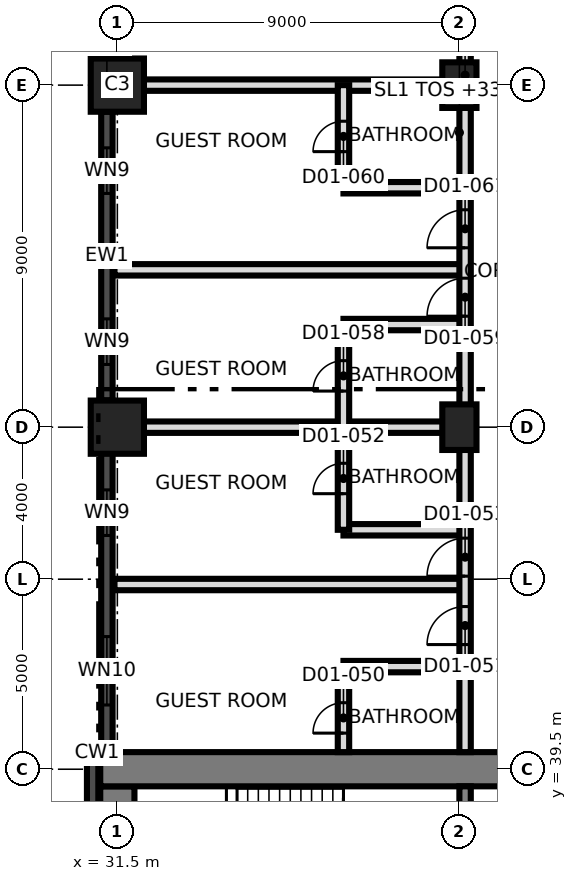
"""IFC4 building model, lengths in metres.
Left out: names, types, materials, properties, quantities, classifications, styles, units other than length and angle.
Written with IfcOpenShell. Run it as: python <this file> out.ifc"""

import sys

from ifc_helpers import new_model, si_unit, direction, frame, frame_2d, origin, origin_2d, place, context, subcontext, project, spatial, rectangle, extrude, element, fill, save


model = new_model("IFC4")
c1 = context("Model", 3, precision=1e-05, world=origin(), true_north=direction((0.0, 1.0)))
c2 = subcontext(c1, "Body", "Model", "MODEL_VIEW")
j1 = project(units=[si_unit("LENGTHUNIT", "METRE"), si_unit("PLANEANGLEUNIT", "RADIAN")], contexts=[c1])
p1 = place(None, origin())
s1 = spatial("IfcSite", under=j1, at=p1, CompositionType="ELEMENT")
p2 = place(p1, origin())
s2 = spatial("IfcBuilding", under=s1, at=p2, CompositionType="ELEMENT")
p3 = place(p2, frame((0.0, 0.0, 33.5)))
s3 = spatial("IfcBuildingStorey", under=s2, at=p3, CompositionType="ELEMENT", Elevation=33.5)
p4 = place(p3, frame((31.5, 21.95, 0.0), z_axis=(0.0, 0.0, 1.0), x_axis=(0.0, 1.0, 0.0)))
e1 = element("IfcWall", 1, at=p4, inside=s3, PredefinedType="SHEAR", context=c2, shape_type="SweptSolid", body=[
    extrude(rectangle(XDim=17.1, YDim=0.9, at=frame_2d((8.55, 0.0))), origin(), (0.0, 0.0, 1.0), 3.7),
])
p5 = place(p3, frame((31.05, 39.5, 0.0), z_axis=(0.0, 0.0, 1.0), x_axis=(1.0, 0.0, 0.0)))
e2 = element("IfcWall", 2, at=p5, inside=s3, PredefinedType="SHEAR", context=c2, shape_type="SweptSolid", body=[
    extrude(rectangle(XDim=27.0, YDim=0.9, at=frame_2d((13.5, 0.0))), origin(), (0.0, 0.0, 1.0), 3.7),
])
p6 = place(p5, frame((10.65, 0.0, 0.0)))
e3 = element("IfcOpeningElement", 3, at=p6, cuts=e2, PredefinedType="OPENING", context=c2, shape_type="SweptSolid", body=[
    extrude(rectangle(XDim=1.2, YDim=2.1, at=frame_2d((0.6, 1.05))), frame((0.0, 0.46, 0.0), z_axis=(0.0, -1.0, 0.0), x_axis=(1.0, 0.0, 0.0)), (0.0, 0.0, 1.0), 0.92),
])
p7 = place(p3, frame((40.65, 33.5, 0.0), z_axis=(0.0, 0.0, 1.0), x_axis=(0.0, 1.0, 0.0)))
e4 = element("IfcWall", 4, at=p7, inside=s3, PredefinedType="SHEAR", context=c2, shape_type="SweptSolid", body=[
    extrude(rectangle(XDim=5.55, YDim=0.3, at=frame_2d((2.775, 0.0))), origin(), (0.0, 0.0, 1.0), 3.7),
])
p8 = place(p3, frame((31.5, 48.5, 0.0), z_axis=(0.0, 0.0, 1.0), x_axis=(1.0, 0.0, 0.0)))
e5 = element("IfcColumn", 5, at=p8, inside=s3, PredefinedType="COLUMN", context=c2, shape_type="SweptSolid", body=[
    extrude(rectangle(XDim=1.4, YDim=1.4, at=origin_2d()), origin(), (0.0, 0.0, 1.0), 3.7),
])
p9 = place(p3, frame((40.5, 48.5, 0.0), z_axis=(0.0, 0.0, 1.0), x_axis=(0.0, 1.0, 0.0)))
e6 = element("IfcColumn", 6, at=p9, inside=s3, PredefinedType="COLUMN", context=c2, shape_type="SweptSolid", body=[
    extrude(rectangle(XDim=1.2, YDim=0.9, at=origin_2d()), origin(), (0.0, 0.0, 1.0), 3.7),
])
p10 = place(p3, frame((31.5, 57.5, 0.0), z_axis=(0.0, 0.0, 1.0), x_axis=(1.0, 0.0, 0.0)))
e7 = element("IfcColumn", 7, at=p10, inside=s3, PredefinedType="COLUMN", context=c2, shape_type="SweptSolid", body=[
    extrude(rectangle(XDim=1.4, YDim=1.4, at=origin_2d()), origin(), (0.0, 0.0, 1.0), 3.7),
])
p11 = place(p3, frame((40.5, 57.5, 0.0), z_axis=(0.0, 0.0, 1.0), x_axis=(0.0, 1.0, 0.0)))
e8 = element("IfcColumn", 8, at=p11, inside=s3, PredefinedType="COLUMN", context=c2, shape_type="SweptSolid", body=[
    extrude(rectangle(XDim=1.2, YDim=0.9, at=origin_2d()), origin(), (0.0, 0.0, 1.0), 3.7),
])
p12 = place(p3, frame((31.225, 65.8, 0.0), z_axis=(0.0, 0.0, 1.0), x_axis=(0.0, -1.0, 0.0)))
e9 = element("IfcWall", 9, at=p12, inside=s3, PredefinedType="SOLIDWALL", context=c2, shape_type="SweptSolid", body=[
    extrude(rectangle(XDim=7.6, YDim=0.3, at=frame_2d((3.8, 0.0))), origin(), (0.0, 0.0, 1.0), 2.7),
])
p13 = place(p12, frame((5.45, 0.0, 0.9)))
e10 = element("IfcOpeningElement", 10, at=p13, cuts=e9, PredefinedType="OPENING", context=c2, shape_type="SweptSolid", body=[
    extrude(rectangle(XDim=1.2, YDim=1.5, at=frame_2d((0.6, 0.75))), frame((0.0, 0.16, 0.0), z_axis=(0.0, -1.0, 0.0), x_axis=(1.0, 0.0, 0.0)), (0.0, 0.0, 1.0), 0.32),
])
p14 = place(p3, frame((31.225, 58.2, 0.0), z_axis=(0.0, 0.0, 1.0), x_axis=(0.0, -1.0, 0.0)))
e11 = element("IfcWall", 11, at=p14, inside=s3, PredefinedType="SOLIDWALL", context=c2, shape_type="SweptSolid", body=[
    extrude(rectangle(XDim=1.4, YDim=0.3, at=frame_2d((0.7, 0.0))), origin(), (0.0, 0.0, 1.0), 3.4),
])
p15 = place(p3, frame((31.225, 56.8, 0.0), z_axis=(0.0, 0.0, 1.0), x_axis=(0.0, -1.0, 0.0)))
e12 = element("IfcWall", 12, at=p15, inside=s3, PredefinedType="SOLIDWALL", context=c2, shape_type="SweptSolid", body=[
    extrude(rectangle(XDim=7.6, YDim=0.3, at=frame_2d((3.8, 0.0))), origin(), (0.0, 0.0, 1.0), 2.7),
])
p16 = place(p15, frame((0.95, 0.0, 0.9)))
e13 = element("IfcOpeningElement", 13, at=p16, cuts=e12, PredefinedType="OPENING", context=c2, shape_type="SweptSolid", body=[
    extrude(rectangle(XDim=1.2, YDim=1.5, at=frame_2d((0.6, 0.75))), frame((0.0, 0.16, 0.0), z_axis=(0.0, -1.0, 0.0), x_axis=(1.0, 0.0, 0.0)), (0.0, 0.0, 1.0), 0.32),
])
p17 = place(p15, frame((5.45, 0.0, 0.9)))
e14 = element("IfcOpeningElement", 14, at=p17, cuts=e12, PredefinedType="OPENING", context=c2, shape_type="SweptSolid", body=[
    extrude(rectangle(XDim=1.2, YDim=1.5, at=frame_2d((0.6, 0.75))), frame((0.0, 0.16, 0.0), z_axis=(0.0, -1.0, 0.0), x_axis=(1.0, 0.0, 0.0)), (0.0, 0.0, 1.0), 0.32),
])
p18 = place(p3, frame((31.225, 49.2, 0.0), z_axis=(0.0, 0.0, 1.0), x_axis=(0.0, -1.0, 0.0)))
e15 = element("IfcWall", 15, at=p18, inside=s3, PredefinedType="SOLIDWALL", context=c2, shape_type="SweptSolid", body=[
    extrude(rectangle(XDim=9.02, YDim=0.3, at=frame_2d((4.51, 0.0))), origin(), (0.0, 0.0, 1.0), 3.4),
])
p19 = place(p18, frame((2.35, 0.0, 0.9)))
e16 = element("IfcOpeningElement", 16, at=p19, cuts=e15, PredefinedType="OPENING", context=c2, shape_type="SweptSolid", body=[
    extrude(rectangle(XDim=1.2, YDim=1.5, at=frame_2d((0.6, 0.75))), frame((0.0, 0.16, 0.0), z_axis=(0.0, -1.0, 0.0), x_axis=(1.0, 0.0, 0.0)), (0.0, 0.0, 1.0), 0.32),
])
p20 = place(p18, frame((6.21, 0.0, 0.3)))
e17 = element("IfcOpeningElement", 17, at=p20, cuts=e15, PredefinedType="OPENING", context=c2, shape_type="SweptSolid", body=[
    extrude(rectangle(XDim=1.8, YDim=2.4, at=frame_2d((0.9, 1.2))), frame((0.0, 0.16, 0.0), z_axis=(0.0, -1.0, 0.0), x_axis=(1.0, 0.0, 0.0)), (0.0, 0.0, 1.0), 0.32),
])
p21 = place(p3, frame((30.85, 39.674, 0.0), z_axis=(0.0, 0.0, 1.0), x_axis=(0.0, -1.0, 0.0)))
e18 = element("IfcWall", 18, at=p21, inside=s3, PredefinedType="SOLIDWALL", context=c2, shape_type="SweptSolid", body=[
    extrude(rectangle(XDim=18.314, YDim=0.3, at=frame_2d((9.157, 0.0))), origin(), (0.0, 0.0, 1.0), 3.4),
])
p22 = place(p3, frame((37.45, 42.2, 0.0), z_axis=(0.0, 0.0, 1.0), x_axis=(1.0, 0.0, 0.0)))
e19 = element("IfcWall", 19, at=p22, inside=s3, PredefinedType="PARTITIONING", context=c2, shape_type="SweptSolid", body=[
    extrude(rectangle(XDim=3.2, YDim=0.3, at=frame_2d((1.6, 0.0))), origin(), (0.0, 0.0, 1.0), 3.4),
])
p23 = place(p3, frame((31.425, 44.36, 0.0), z_axis=(0.0, 0.0, 1.0), x_axis=(1.0, 0.0, 0.0)))
e20 = element("IfcWall", 20, at=p23, inside=s3, PredefinedType="PARTITIONING", context=c2, shape_type="SweptSolid", body=[
    extrude(rectangle(XDim=9.225, YDim=0.3, at=frame_2d((4.612, 0.0))), origin(), (0.0, 0.0, 1.0), 3.4),
])
p24 = place(p3, frame((37.45, 45.8, 0.0), z_axis=(0.0, 0.0, 1.0), x_axis=(1.0, 0.0, 0.0)))
e21 = element("IfcWall", 21, at=p24, inside=s3, PredefinedType="PARTITIONING", context=c2, shape_type="SweptSolid", body=[
    extrude(rectangle(XDim=3.2, YDim=0.3, at=frame_2d((1.6, 0.0))), origin(), (0.0, 0.0, 1.0), 3.4),
])
p25 = place(p3, frame((31.425, 48.5, 0.0), z_axis=(0.0, 0.0, 1.0), x_axis=(1.0, 0.0, 0.0)))
e22 = element("IfcWall", 22, at=p25, inside=s3, PredefinedType="PARTITIONING", context=c2, shape_type="SweptSolid", body=[
    extrude(rectangle(XDim=9.225, YDim=0.3, at=frame_2d((4.612, 0.0))), origin(), (0.0, 0.0, 1.0), 3.4),
])
p26 = place(p3, frame((37.45, 51.2, 0.0), z_axis=(0.0, 0.0, 1.0), x_axis=(1.0, 0.0, 0.0)))
e23 = element("IfcWall", 23, at=p26, inside=s3, PredefinedType="PARTITIONING", context=c2, shape_type="SweptSolid", body=[
    extrude(rectangle(XDim=3.2, YDim=0.3, at=frame_2d((1.6, 0.0))), origin(), (0.0, 0.0, 1.0), 3.4),
])
p27 = place(p3, frame((31.425, 52.64, 0.0), z_axis=(0.0, 0.0, 1.0), x_axis=(1.0, 0.0, 0.0)))
e24 = element("IfcWall", 24, at=p27, inside=s3, PredefinedType="PARTITIONING", context=c2, shape_type="SweptSolid", body=[
    extrude(rectangle(XDim=9.225, YDim=0.3, at=frame_2d((4.612, 0.0))), origin(), (0.0, 0.0, 1.0), 3.4),
])
p28 = place(p3, frame((37.45, 54.8, 0.0), z_axis=(0.0, 0.0, 1.0), x_axis=(1.0, 0.0, 0.0)))
e25 = element("IfcWall", 25, at=p28, inside=s3, PredefinedType="PARTITIONING", context=c2, shape_type="SweptSolid", body=[
    extrude(rectangle(XDim=3.2, YDim=0.3, at=frame_2d((1.6, 0.0))), origin(), (0.0, 0.0, 1.0), 3.4),
])
p29 = place(p3, frame((31.425, 57.5, 0.0), z_axis=(0.0, 0.0, 1.0), x_axis=(1.0, 0.0, 0.0)))
e26 = element("IfcWall", 26, at=p29, inside=s3, PredefinedType="PARTITIONING", context=c2, shape_type="SweptSolid", body=[
    extrude(rectangle(XDim=9.225, YDim=0.3, at=frame_2d((4.612, 0.0))), origin(), (0.0, 0.0, 1.0), 3.4),
])
p30 = place(p3, frame((37.45, 39.95, 0.0), z_axis=(0.0, 0.0, 1.0), x_axis=(0.0, 1.0, 0.0)))
e27 = element("IfcWall", 27, at=p30, inside=s3, PredefinedType="PARTITIONING", context=c2, shape_type="SweptSolid", body=[
    extrude(rectangle(XDim=2.25, YDim=0.3, at=frame_2d((1.125, 0.0))), origin(), (0.0, 0.0, 1.0), 3.4),
])
p31 = place(p30, frame((0.5, 0.0, 0.0)))
e28 = element("IfcOpeningElement", 28, at=p31, cuts=e27, PredefinedType="OPENING", context=c2, shape_type="SweptSolid", body=[
    extrude(rectangle(XDim=0.8, YDim=2.1, at=frame_2d((0.4, 1.05))), frame((0.0, 0.16, 0.0), z_axis=(0.0, -1.0, 0.0), x_axis=(1.0, 0.0, 0.0)), (0.0, 0.0, 1.0), 0.32),
])
p32 = place(p3, frame((37.45, 45.8, 0.0), z_axis=(0.0, 0.0, 1.0), x_axis=(0.0, 1.0, 0.0)))
e29 = element("IfcWall", 29, at=p32, inside=s3, PredefinedType="PARTITIONING", context=c2, shape_type="SweptSolid", body=[
    extrude(rectangle(XDim=5.4, YDim=0.3, at=frame_2d((2.7, 0.0))), origin(), (0.0, 0.0, 1.0), 3.4),
])
p33 = place(p32, frame((0.95, 0.0, 0.0)))
e30 = element("IfcOpeningElement", 30, at=p33, cuts=e29, PredefinedType="OPENING", context=c2, shape_type="SweptSolid", body=[
    extrude(rectangle(XDim=0.8, YDim=2.1, at=frame_2d((0.4, 1.05))), frame((0.0, 0.16, 0.0), z_axis=(0.0, -1.0, 0.0), x_axis=(1.0, 0.0, 0.0)), (0.0, 0.0, 1.0), 0.32),
])
p34 = place(p32, frame((3.65, 0.0, 0.0)))
e31 = element("IfcOpeningElement", 31, at=p34, cuts=e29, PredefinedType="OPENING", context=c2, shape_type="SweptSolid", body=[
    extrude(rectangle(XDim=0.8, YDim=2.1, at=frame_2d((0.4, 1.05))), frame((0.0, 0.16, 0.0), z_axis=(0.0, -1.0, 0.0), x_axis=(1.0, 0.0, 0.0)), (0.0, 0.0, 1.0), 0.32),
])
p35 = place(p3, frame((37.45, 54.8, 0.0), z_axis=(0.0, 0.0, 1.0), x_axis=(0.0, 1.0, 0.0)))
e32 = element("IfcWall", 32, at=p35, inside=s3, PredefinedType="PARTITIONING", context=c2, shape_type="SweptSolid", body=[
    extrude(rectangle(XDim=2.7, YDim=0.3, at=frame_2d((1.35, 0.0))), origin(), (0.0, 0.0, 1.0), 3.4),
])
p36 = place(p35, frame((0.95, 0.0, 0.0)))
e33 = element("IfcOpeningElement", 33, at=p36, cuts=e32, PredefinedType="OPENING", context=c2, shape_type="SweptSolid", body=[
    extrude(rectangle(XDim=0.8, YDim=2.1, at=frame_2d((0.4, 1.05))), frame((0.0, 0.16, 0.0), z_axis=(0.0, -1.0, 0.0), x_axis=(1.0, 0.0, 0.0)), (0.0, 0.0, 1.0), 0.32),
])
p37 = place(p3, frame((40.65, 39.95, 0.0), z_axis=(0.0, 0.0, 1.0), x_axis=(0.0, 1.0, 0.0)))
e34 = element("IfcWall", 34, at=p37, inside=s3, PredefinedType="PARTITIONING", context=c2, shape_type="SweptSolid", body=[
    extrude(rectangle(XDim=35.625, YDim=0.3, at=frame_2d((17.812, 0.0))), origin(), (0.0, 0.0, 1.0), 3.4),
])
p38 = place(p37, frame((2.83, 0.0, 0.0)))
e35 = element("IfcOpeningElement", 35, at=p38, cuts=e34, PredefinedType="OPENING", context=c2, shape_type="SweptSolid", body=[
    extrude(rectangle(XDim=1.0, YDim=2.1, at=frame_2d((0.5, 1.05))), frame((0.0, 0.16, 0.0), z_axis=(0.0, -1.0, 0.0), x_axis=(1.0, 0.0, 0.0)), (0.0, 0.0, 1.0), 0.32),
])
p39 = place(p37, frame((4.63, 0.0, 0.0)))
e36 = element("IfcOpeningElement", 36, at=p39, cuts=e34, PredefinedType="OPENING", context=c2, shape_type="SweptSolid", body=[
    extrude(rectangle(XDim=1.0, YDim=2.1, at=frame_2d((0.5, 1.05))), frame((0.0, 0.16, 0.0), z_axis=(0.0, -1.0, 0.0), x_axis=(1.0, 0.0, 0.0)), (0.0, 0.0, 1.0), 0.32),
])
p40 = place(p37, frame((11.47, 0.0, 0.0)))
e37 = element("IfcOpeningElement", 37, at=p40, cuts=e34, PredefinedType="OPENING", context=c2, shape_type="SweptSolid", body=[
    extrude(rectangle(XDim=1.0, YDim=2.1, at=frame_2d((0.5, 1.05))), frame((0.0, 0.16, 0.0), z_axis=(0.0, -1.0, 0.0), x_axis=(1.0, 0.0, 0.0)), (0.0, 0.0, 1.0), 0.32),
])
p41 = place(p37, frame((13.27, 0.0, 0.0)))
e38 = element("IfcOpeningElement", 38, at=p41, cuts=e34, PredefinedType="OPENING", context=c2, shape_type="SweptSolid", body=[
    extrude(rectangle(XDim=1.0, YDim=2.1, at=frame_2d((0.5, 1.05))), frame((0.0, 0.16, 0.0), z_axis=(0.0, -1.0, 0.0), x_axis=(1.0, 0.0, 0.0)), (0.0, 0.0, 1.0), 0.32),
])
p42 = place(p37, frame((21.05, 0.0, 0.0)))
e39 = element("IfcOpeningElement", 39, at=p42, cuts=e34, PredefinedType="OPENING", context=c2, shape_type="SweptSolid", body=[
    extrude(rectangle(XDim=1.0, YDim=2.4, at=frame_2d((0.5, 1.2))), frame((0.0, 0.16, 0.0), z_axis=(0.0, -1.0, 0.0), x_axis=(1.0, 0.0, 0.0)), (0.0, 0.0, 1.0), 0.32),
])
p43 = place(p16, origin())
e40 = element("IfcWindow", 40, at=p43, inside=s3, PartitioningType="SINGLE_PANEL", PredefinedType="WINDOW", context=c2, shape_type="SweptSolid", body=[
    extrude(rectangle(XDim=1.2, YDim=1.5, at=frame_2d((0.6, 0.75))), frame((0.0, 0.03, 0.0), z_axis=(0.0, -1.0, 0.0), x_axis=(1.0, 0.0, 0.0)), (0.0, 0.0, 1.0), 0.06),
])
fill(e13, e40)
p44 = place(p17, origin())
e41 = element("IfcWindow", 41, at=p44, inside=s3, PartitioningType="SINGLE_PANEL", PredefinedType="WINDOW", context=c2, shape_type="SweptSolid", body=[
    extrude(rectangle(XDim=1.2, YDim=1.5, at=frame_2d((0.6, 0.75))), frame((0.0, 0.03, 0.0), z_axis=(0.0, -1.0, 0.0), x_axis=(1.0, 0.0, 0.0)), (0.0, 0.0, 1.0), 0.06),
])
fill(e14, e41)
p45 = place(p19, origin())
e42 = element("IfcWindow", 42, at=p45, inside=s3, PartitioningType="SINGLE_PANEL", PredefinedType="WINDOW", context=c2, shape_type="SweptSolid", body=[
    extrude(rectangle(XDim=1.2, YDim=1.5, at=frame_2d((0.6, 0.75))), frame((0.0, 0.03, 0.0), z_axis=(0.0, -1.0, 0.0), x_axis=(1.0, 0.0, 0.0)), (0.0, 0.0, 1.0), 0.06),
])
fill(e16, e42)
p46 = place(p20, origin())
e43 = element("IfcWindow", 43, at=p46, inside=s3, PartitioningType="SINGLE_PANEL", PredefinedType="WINDOW", context=c2, shape_type="SweptSolid", body=[
    extrude(rectangle(XDim=1.8, YDim=2.4, at=frame_2d((0.9, 1.2))), frame((0.0, 0.03, 0.0), z_axis=(0.0, -1.0, 0.0), x_axis=(1.0, 0.0, 0.0)), (0.0, 0.0, 1.0), 0.06),
])
fill(e17, e43)
p47 = place(p31, origin())
e44 = element("IfcDoor", 44, at=p47, inside=s3, OperationType="SINGLE_SWING_LEFT", PredefinedType="DOOR", context=c2, shape_type="SweptSolid", body=[
    extrude(rectangle(XDim=0.8, YDim=2.1, at=frame_2d((0.4, 1.05))), frame((0.0, 0.025, 0.0), z_axis=(0.0, -1.0, 0.0), x_axis=(1.0, 0.0, 0.0)), (0.0, 0.0, 1.0), 0.05),
])
fill(e28, e44)
p48 = place(p38, origin())
e45 = element("IfcDoor", 45, at=p48, inside=s3, OperationType="SINGLE_SWING_RIGHT", PredefinedType="DOOR", context=c2, shape_type="SweptSolid", body=[
    extrude(rectangle(XDim=1.0, YDim=2.1, at=frame_2d((0.5, 1.05))), frame((0.0, 0.025, 0.0), z_axis=(0.0, -1.0, 0.0), x_axis=(1.0, 0.0, 0.0)), (0.0, 0.0, 1.0), 0.05),
])
fill(e35, e45)
p49 = place(p33, origin())
e46 = element("IfcDoor", 46, at=p49, inside=s3, OperationType="SINGLE_SWING_RIGHT", PredefinedType="DOOR", context=c2, shape_type="SweptSolid", body=[
    extrude(rectangle(XDim=0.8, YDim=2.1, at=frame_2d((0.4, 1.05))), frame((0.0, 0.025, 0.0), z_axis=(0.0, -1.0, 0.0), x_axis=(1.0, 0.0, 0.0)), (0.0, 0.0, 1.0), 0.05),
])
fill(e30, e46)
p50 = place(p39, origin())
e47 = element("IfcDoor", 47, at=p50, inside=s3, OperationType="SINGLE_SWING_LEFT", PredefinedType="DOOR", context=c2, shape_type="SweptSolid", body=[
    extrude(rectangle(XDim=1.0, YDim=2.1, at=frame_2d((0.5, 1.05))), frame((0.0, 0.025, 0.0), z_axis=(0.0, -1.0, 0.0), x_axis=(1.0, 0.0, 0.0)), (0.0, 0.0, 1.0), 0.05),
])
fill(e36, e47)
p51 = place(p34, origin())
e48 = element("IfcDoor", 48, at=p51, inside=s3, OperationType="SINGLE_SWING_RIGHT", PredefinedType="DOOR", context=c2, shape_type="SweptSolid", body=[
    extrude(rectangle(XDim=0.8, YDim=2.1, at=frame_2d((0.4, 1.05))), frame((0.0, 0.025, 0.0), z_axis=(0.0, -1.0, 0.0), x_axis=(1.0, 0.0, 0.0)), (0.0, 0.0, 1.0), 0.05),
])
fill(e31, e48)
p52 = place(p40, origin())
e49 = element("IfcDoor", 49, at=p52, inside=s3, OperationType="SINGLE_SWING_LEFT", PredefinedType="DOOR", context=c2, shape_type="SweptSolid", body=[
    extrude(rectangle(XDim=1.0, YDim=2.1, at=frame_2d((0.5, 1.05))), frame((0.0, 0.025, 0.0), z_axis=(0.0, -1.0, 0.0), x_axis=(1.0, 0.0, 0.0)), (0.0, 0.0, 1.0), 0.05),
])
fill(e37, e49)
p53 = place(p36, origin())
e50 = element("IfcDoor", 50, at=p53, inside=s3, OperationType="SINGLE_SWING_LEFT", PredefinedType="DOOR", context=c2, shape_type="SweptSolid", body=[
    extrude(rectangle(XDim=0.8, YDim=2.1, at=frame_2d((0.4, 1.05))), frame((0.0, 0.025, 0.0), z_axis=(0.0, -1.0, 0.0), x_axis=(1.0, 0.0, 0.0)), (0.0, 0.0, 1.0), 0.05),
])
fill(e33, e50)
p54 = place(p41, origin())
e51 = element("IfcDoor", 51, at=p54, inside=s3, OperationType="SINGLE_SWING_LEFT", PredefinedType="DOOR", context=c2, shape_type="SweptSolid", body=[
    extrude(rectangle(XDim=1.0, YDim=2.1, at=frame_2d((0.5, 1.05))), frame((0.0, 0.025, 0.0), z_axis=(0.0, -1.0, 0.0), x_axis=(1.0, 0.0, 0.0)), (0.0, 0.0, 1.0), 0.05),
])
fill(e38, e51)
save(model, sys.argv[1])
